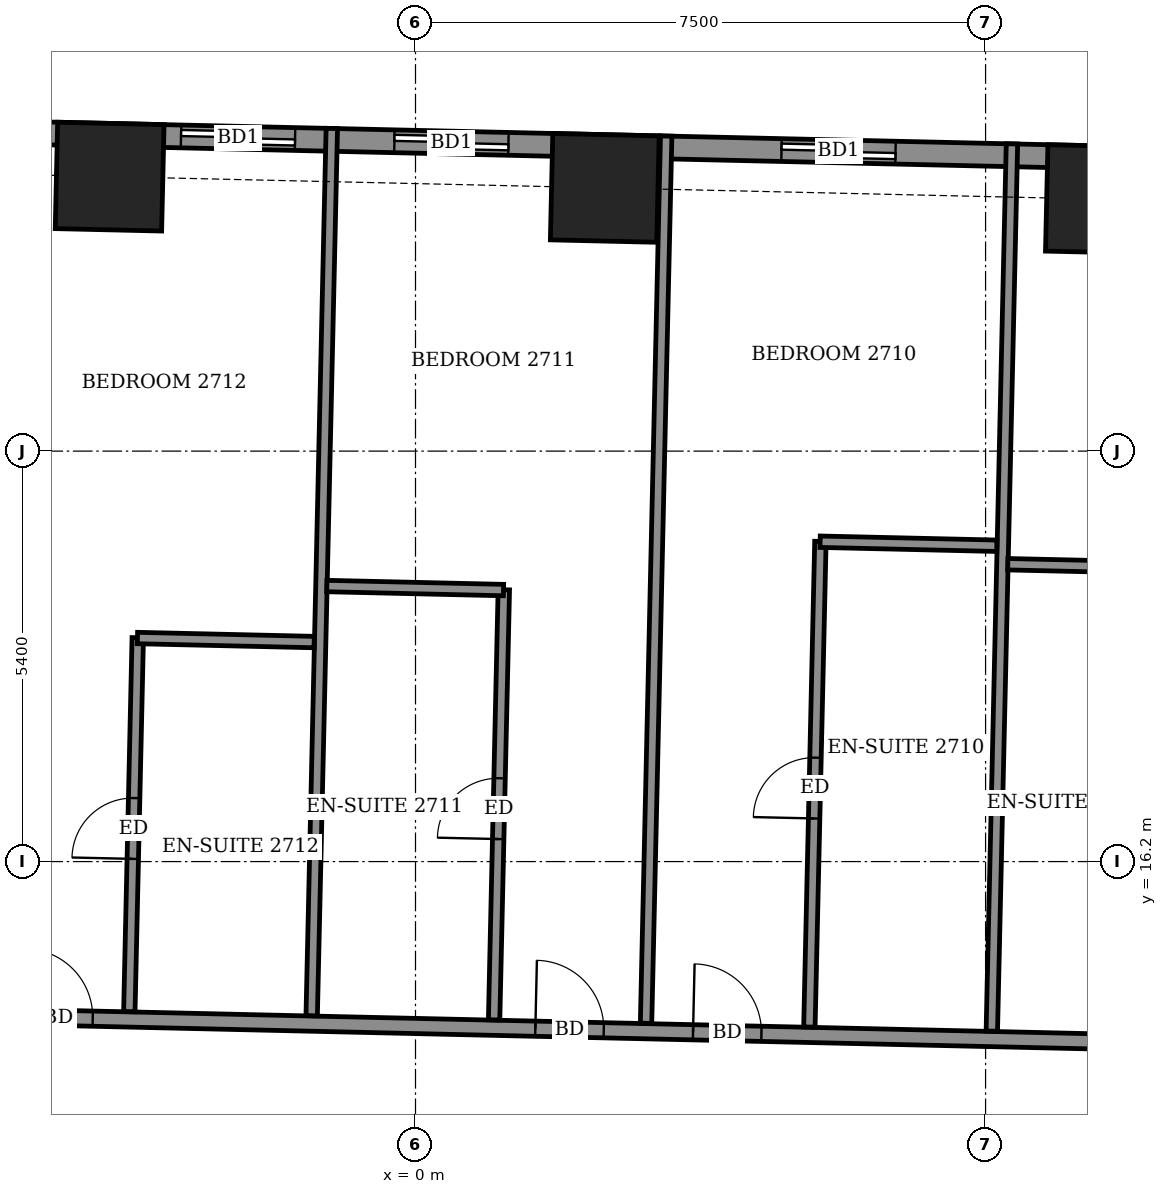
"""IFC4 building model, lengths in metres.
Left out: names, types, materials, properties, quantities, classifications, styles, units other than length and angle.
Written with IfcOpenShell. Run it as: python <this file> out.ifc"""

import sys

from ifc_helpers import new_model, si_unit, direction, frame, frame_2d, origin, origin_2d, place, context, subcontext, project, spatial, rectangle, extrude, element, fill, save


model = new_model("IFC4")
c1 = context("Model", 3, precision=1e-05, world=origin(), true_north=direction((0.0, 1.0)))
c2 = subcontext(c1, "Body", "Model", "MODEL_VIEW")
j1 = project(units=[si_unit("LENGTHUNIT", "METRE"), si_unit("PLANEANGLEUNIT", "RADIAN")], contexts=[c1])
p1 = place(None, origin())
s1 = spatial("IfcSite", under=j1, at=p1, CompositionType="ELEMENT")
p2 = place(p1, origin())
s2 = spatial("IfcBuilding", under=s1, at=p2, CompositionType="ELEMENT")
p3 = place(p2, frame((0.0, 0.0, 109.1)))
s3 = spatial("IfcBuildingStorey", under=s2, at=p3, CompositionType="ELEMENT", Elevation=109.1)
for number, where, z_axis, x_axis in (
    (1, (9.004, 24.915, -0.55), (0.0, 0.0, 1.0), (-1.0, 0.023, 0.0)),
    (2, (2.49, 25.063, -0.55), (0.0, 0.0, 1.0), (-1.0, 0.023, 0.0)),
    (3, (-4.024, 25.211, -0.55), (0.0, 0.0, 1.0), (-1.0, 0.023, 0.0)),
):
    element("IfcColumn", number, at=place(p3, frame(where, z_axis=z_axis, x_axis=x_axis)), inside=s3, PredefinedType="COLUMN", context=c2, shape_type="SweptSolid", body=[
        extrude(rectangle(XDim=1.4, YDim=1.4, at=origin_2d()), origin(), (0.0, 0.0, 1.0), 3.6),
    ])
p4 = place(p3, frame((21.894, 25.173, 0.0), z_axis=(0.0, 0.0, 1.0), x_axis=(-0.999742661083, 0.022685052594, 0.0)))
e4 = element("IfcWall", 4, at=p4, inside=s3, PredefinedType="SOLIDWALL", context=c2, shape_type="SweptSolid", body=[
    extrude(rectangle(XDim=45.309, YDim=0.3, at=frame_2d((22.654, 0.0))), origin(), (0.0, 0.0, 1.0), 3.05),
])
p5 = place(p4, frame((2.319, 0.0, 0.0)))
e5 = element("IfcOpeningElement", 5, at=p5, cuts=e4, PredefinedType="OPENING", context=c2, shape_type="SweptSolid", body=[
    extrude(rectangle(XDim=1.5, YDim=2.4, at=frame_2d((0.75, 1.2))), frame((0.0, 0.16, 0.0), z_axis=(0.0, -1.0, 0.0), x_axis=(1.0, 0.0, 0.0)), (0.0, 0.0, 1.0), 0.32),
])
p6 = place(p4, frame((7.437, 0.0, 0.0)))
e6 = element("IfcOpeningElement", 6, at=p6, cuts=e4, PredefinedType="OPENING", context=c2, shape_type="SweptSolid", body=[
    extrude(rectangle(XDim=1.5, YDim=2.4, at=frame_2d((0.75, 1.2))), frame((0.0, 0.16, 0.0), z_axis=(0.0, -1.0, 0.0), x_axis=(1.0, 0.0, 0.0)), (0.0, 0.0, 1.0), 0.32),
])
p7 = place(p4, frame((10.244, 0.0, 0.0)))
e7 = element("IfcOpeningElement", 7, at=p7, cuts=e4, PredefinedType="OPENING", context=c2, shape_type="SweptSolid", body=[
    extrude(rectangle(XDim=1.5, YDim=2.4, at=frame_2d((0.75, 1.2))), frame((0.0, 0.16, 0.0), z_axis=(0.0, -1.0, 0.0), x_axis=(1.0, 0.0, 0.0)), (0.0, 0.0, 1.0), 0.32),
])
p8 = place(p4, frame((15.583, 0.0, 0.0)))
e8 = element("IfcOpeningElement", 8, at=p8, cuts=e4, PredefinedType="OPENING", context=c2, shape_type="SweptSolid", body=[
    extrude(rectangle(XDim=1.5, YDim=2.4, at=frame_2d((0.75, 1.2))), frame((0.0, 0.16, 0.0), z_axis=(0.0, -1.0, 0.0), x_axis=(1.0, 0.0, 0.0)), (0.0, 0.0, 1.0), 0.32),
])
p9 = place(p4, frame((20.677, 0.0, 0.0)))
e9 = element("IfcOpeningElement", 9, at=p9, cuts=e4, PredefinedType="OPENING", context=c2, shape_type="SweptSolid", body=[
    extrude(rectangle(XDim=1.5, YDim=2.4, at=frame_2d((0.75, 1.2))), frame((0.0, 0.16, 0.0), z_axis=(0.0, -1.0, 0.0), x_axis=(1.0, 0.0, 0.0)), (0.0, 0.0, 1.0), 0.32),
])
p10 = place(p4, frame((23.485, 0.0, 0.0)))
e10 = element("IfcOpeningElement", 10, at=p10, cuts=e4, PredefinedType="OPENING", context=c2, shape_type="SweptSolid", body=[
    extrude(rectangle(XDim=1.5, YDim=2.4, at=frame_2d((0.75, 1.2))), frame((0.0, 0.16, 0.0), z_axis=(0.0, -1.0, 0.0), x_axis=(1.0, 0.0, 0.0)), (0.0, 0.0, 1.0), 0.32),
])
p11 = place(p4, frame((28.708, 0.0, 0.0)))
e11 = element("IfcOpeningElement", 11, at=p11, cuts=e4, PredefinedType="OPENING", context=c2, shape_type="SweptSolid", body=[
    extrude(rectangle(XDim=1.5, YDim=2.4, at=frame_2d((0.75, 1.2))), frame((0.0, 0.16, 0.0), z_axis=(0.0, -1.0, 0.0), x_axis=(1.0, 0.0, 0.0)), (0.0, 0.0, 1.0), 0.32),
])
p12 = place(p4, frame((33.793, 0.0, 0.0)))
e12 = element("IfcOpeningElement", 12, at=p12, cuts=e4, PredefinedType="OPENING", context=c2, shape_type="SweptSolid", body=[
    extrude(rectangle(XDim=1.5, YDim=2.4, at=frame_2d((0.75, 1.2))), frame((0.0, 0.16, 0.0), z_axis=(0.0, -1.0, 0.0), x_axis=(1.0, 0.0, 0.0)), (0.0, 0.0, 1.0), 0.32),
])
p13 = place(p4, frame((36.6, 0.0, 0.0)))
e13 = element("IfcOpeningElement", 13, at=p13, cuts=e4, PredefinedType="OPENING", context=c2, shape_type="SweptSolid", body=[
    extrude(rectangle(XDim=1.5, YDim=2.4, at=frame_2d((0.75, 1.2))), frame((0.0, 0.16, 0.0), z_axis=(0.0, -1.0, 0.0), x_axis=(1.0, 0.0, 0.0)), (0.0, 0.0, 1.0), 0.32),
])
p14 = place(p4, frame((41.318, 0.0, 0.9)))
e14 = element("IfcOpeningElement", 14, at=p14, cuts=e4, PredefinedType="OPENING", context=c2, shape_type="SweptSolid", body=[
    extrude(rectangle(XDim=2.4, YDim=1.5, at=frame_2d((1.2, 0.75))), frame((0.0, 0.16, 0.0), z_axis=(0.0, -1.0, 0.0), x_axis=(1.0, 0.0, 0.0)), (0.0, 0.0, 1.0), 0.32),
])
p15 = place(p3, frame((-26.316, 14.634, 0.0), z_axis=(0.0, 0.0, 1.0), x_axis=(0.999742734556, -0.02268181435, 0.0)))
e15 = element("IfcWall", 15, at=p15, inside=s3, PredefinedType="PARTITIONING", context=c2, shape_type="SweptSolid", body=[
    extrude(rectangle(XDim=50.708, YDim=0.2, at=frame_2d((25.354, 0.0))), origin(), (0.0, 0.0, 1.0), 3.05),
])
p16 = place(p15, frame((48.229, 0.0, 0.0)))
e16 = element("IfcOpeningElement", 16, at=p16, cuts=e15, PredefinedType="OPENING", context=c2, shape_type="SweptSolid", body=[
    extrude(rectangle(XDim=1.0, YDim=2.1, at=frame_2d((0.5, 1.05))), frame((0.0, 0.11, 0.0), z_axis=(0.0, -1.0, 0.0), x_axis=(1.0, 0.0, 0.0)), (0.0, 0.0, 1.0), 0.22),
])
p17 = place(p15, frame((43.6, 0.0, 0.0)))
e17 = element("IfcOpeningElement", 17, at=p17, cuts=e15, PredefinedType="OPENING", context=c2, shape_type="SweptSolid", body=[
    extrude(rectangle(XDim=0.9, YDim=2.1, at=frame_2d((0.45, 1.05))), frame((0.0, 0.11, 0.0), z_axis=(0.0, -1.0, 0.0), x_axis=(1.0, 0.0, 0.0)), (0.0, 0.0, 1.0), 0.22),
])
p18 = place(p15, frame((38.925, 0.0, 0.0)))
e18 = element("IfcOpeningElement", 18, at=p18, cuts=e15, PredefinedType="OPENING", context=c2, shape_type="SweptSolid", body=[
    extrude(rectangle(XDim=0.9, YDim=2.1, at=frame_2d((0.45, 1.05))), frame((0.0, 0.11, 0.0), z_axis=(0.0, -1.0, 0.0), x_axis=(1.0, 0.0, 0.0)), (0.0, 0.0, 1.0), 0.22),
])
p19 = place(p15, frame((36.9, 0.0, 0.0)))
e19 = element("IfcOpeningElement", 19, at=p19, cuts=e15, PredefinedType="OPENING", context=c2, shape_type="SweptSolid", body=[
    extrude(rectangle(XDim=0.9, YDim=2.1, at=frame_2d((0.45, 1.05))), frame((0.0, 0.11, 0.0), z_axis=(0.0, -1.0, 0.0), x_axis=(1.0, 0.0, 0.0)), (0.0, 0.0, 1.0), 0.22),
])
p20 = place(p15, frame((29.975, 0.0, 0.0)))
e20 = element("IfcOpeningElement", 20, at=p20, cuts=e15, PredefinedType="OPENING", context=c2, shape_type="SweptSolid", body=[
    extrude(rectangle(XDim=0.9, YDim=2.1, at=frame_2d((0.45, 1.05))), frame((0.0, 0.11, 0.0), z_axis=(0.0, -1.0, 0.0), x_axis=(1.0, 0.0, 0.0)), (0.0, 0.0, 1.0), 0.22),
])
p21 = place(p15, frame((27.9, 0.0, 0.0)))
e21 = element("IfcOpeningElement", 21, at=p21, cuts=e15, PredefinedType="OPENING", context=c2, shape_type="SweptSolid", body=[
    extrude(rectangle(XDim=0.9, YDim=2.1, at=frame_2d((0.45, 1.05))), frame((0.0, 0.11, 0.0), z_axis=(0.0, -1.0, 0.0), x_axis=(1.0, 0.0, 0.0)), (0.0, 0.0, 1.0), 0.22),
])
p22 = place(p15, frame((21.175, 0.0, 0.0)))
e22 = element("IfcOpeningElement", 22, at=p22, cuts=e15, PredefinedType="OPENING", context=c2, shape_type="SweptSolid", body=[
    extrude(rectangle(XDim=0.9, YDim=2.1, at=frame_2d((0.45, 1.05))), frame((0.0, 0.11, 0.0), z_axis=(0.0, -1.0, 0.0), x_axis=(1.0, 0.0, 0.0)), (0.0, 0.0, 1.0), 0.22),
])
p23 = place(p15, frame((19.25, 0.0, 0.0)))
e23 = element("IfcOpeningElement", 23, at=p23, cuts=e15, PredefinedType="OPENING", context=c2, shape_type="SweptSolid", body=[
    extrude(rectangle(XDim=0.9, YDim=2.1, at=frame_2d((0.45, 1.05))), frame((0.0, 0.11, 0.0), z_axis=(0.0, -1.0, 0.0), x_axis=(1.0, 0.0, 0.0)), (0.0, 0.0, 1.0), 0.22),
])
p24 = place(p15, frame((12.375, 0.0, 0.0)))
e24 = element("IfcOpeningElement", 24, at=p24, cuts=e15, PredefinedType="OPENING", context=c2, shape_type="SweptSolid", body=[
    extrude(rectangle(XDim=0.9, YDim=2.1, at=frame_2d((0.45, 1.05))), frame((0.0, 0.11, 0.0), z_axis=(0.0, -1.0, 0.0), x_axis=(1.0, 0.0, 0.0)), (0.0, 0.0, 1.0), 0.22),
])
p25 = place(p15, frame((10.225, 0.0, 0.0)))
e25 = element("IfcOpeningElement", 25, at=p25, cuts=e15, PredefinedType="OPENING", context=c2, shape_type="SweptSolid", body=[
    extrude(rectangle(XDim=0.9, YDim=2.1, at=frame_2d((0.45, 1.05))), frame((0.0, 0.11, 0.0), z_axis=(0.0, -1.0, 0.0), x_axis=(1.0, 0.0, 0.0)), (0.0, 0.0, 1.0), 0.22),
])
p26 = place(p15, frame((0.85, 0.0, 0.0)))
e26 = element("IfcOpeningElement", 26, at=p26, cuts=e15, PredefinedType="OPENING", context=c2, shape_type="SweptSolid", body=[
    extrude(rectangle(XDim=1.0, YDim=2.1, at=frame_2d((0.5, 1.05))), frame((0.0, 0.11, 0.0), z_axis=(0.0, -1.0, 0.0), x_axis=(1.0, 0.0, 0.0)), (0.0, 0.0, 1.0), 0.22),
])
p27 = place(p15, frame((5.55, 0.0, 0.0)))
e27 = element("IfcOpeningElement", 27, at=p27, cuts=e15, PredefinedType="OPENING", context=c2, shape_type="SweptSolid", body=[
    extrude(rectangle(XDim=0.9, YDim=2.1, at=frame_2d((0.45, 1.05))), frame((0.0, 0.11, 0.0), z_axis=(0.0, -1.0, 0.0), x_axis=(1.0, 0.0, 0.0)), (0.0, 0.0, 1.0), 0.22),
])
p28 = place(p3, frame((-3.765, 14.226, 0.0), z_axis=(0.0, 0.0, 1.0), x_axis=(0.022527535496, 0.999746222871, 0.0)))
e28 = element("IfcWall", 28, at=p28, inside=s3, PredefinedType="PARTITIONING", context=c2, shape_type="SweptSolid", body=[
    extrude(rectangle(XDim=4.92, YDim=0.15, at=frame_2d((2.46, 0.0))), origin(), (0.0, 0.0, 1.0), 3.05),
])
p29 = place(p28, frame((2.01, 0.0, 0.0)))
e29 = element("IfcOpeningElement", 29, at=p29, cuts=e28, PredefinedType="OPENING", context=c2, shape_type="SweptSolid", body=[
    extrude(rectangle(XDim=0.8, YDim=2.1, at=frame_2d((0.4, 1.05))), frame((0.0, 0.085, 0.0), z_axis=(0.0, -1.0, 0.0), x_axis=(1.0, 0.0, 0.0)), (0.0, 0.0, 1.0), 0.17),
])
p30 = place(p3, frame((-1.366, 14.172, 0.0), z_axis=(0.0, 0.0, 1.0), x_axis=(0.022687206857, 0.999742612198, 0.0)))
e30 = element("IfcWall", 30, at=p30, inside=s3, PredefinedType="PARTITIONING", context=c2, shape_type="SweptSolid", body=[
    extrude(rectangle(XDim=11.676, YDim=0.15, at=frame_2d((5.838, 0.0))), origin(), (0.0, 0.0, 1.0), 2.55),
])
p31 = place(p3, frame((1.034, 14.117, 0.0), z_axis=(0.0, 0.0, 1.0), x_axis=(0.022644004729, 0.999743591652, 0.0)))
e31 = element("IfcWall", 31, at=p31, inside=s3, PredefinedType="PARTITIONING", context=c2, shape_type="SweptSolid", body=[
    extrude(rectangle(XDim=5.66, YDim=0.15, at=frame_2d((2.83, 0.0))), origin(), (0.0, 0.0, 1.0), 3.05),
])
p32 = place(p31, frame((2.38, 0.0, 0.0)))
e32 = element("IfcOpeningElement", 32, at=p32, cuts=e31, PredefinedType="OPENING", context=c2, shape_type="SweptSolid", body=[
    extrude(rectangle(XDim=0.8, YDim=2.1, at=frame_2d((0.4, 1.05))), frame((0.0, 0.085, 0.0), z_axis=(0.0, -1.0, 0.0), x_axis=(1.0, 0.0, 0.0)), (0.0, 0.0, 1.0), 0.17),
])
p33 = place(p3, frame((3.033, 14.072, 0.0), z_axis=(0.0, 0.0, 1.0), x_axis=(0.022707631257, 0.999742148498, 0.0)))
e33 = element("IfcWall", 33, at=p33, inside=s3, PredefinedType="PARTITIONING", context=c2, shape_type="SweptSolid", body=[
    extrude(rectangle(XDim=11.676, YDim=0.15, at=frame_2d((5.838, 0.0))), origin(), (0.0, 0.0, 1.0), 2.55),
])
p34 = place(p3, frame((5.182, 14.023, 0.0), z_axis=(0.0, 0.0, 1.0), x_axis=(0.022691900969, 0.999742505664, 0.0)))
e34 = element("IfcWall", 34, at=p34, inside=s3, PredefinedType="PARTITIONING", context=c2, shape_type="SweptSolid", body=[
    extrude(rectangle(XDim=6.391, YDim=0.15, at=frame_2d((3.195, 0.0))), origin(), (0.0, 0.0, 1.0), 3.05),
])
p35 = place(p34, frame((2.745, 0.0, 0.0)))
e35 = element("IfcOpeningElement", 35, at=p35, cuts=e34, PredefinedType="OPENING", context=c2, shape_type="SweptSolid", body=[
    extrude(rectangle(XDim=0.8, YDim=2.1, at=frame_2d((0.4, 1.05))), frame((0.0, 0.085, 0.0), z_axis=(0.0, -1.0, 0.0), x_axis=(1.0, 0.0, 0.0)), (0.0, 0.0, 1.0), 0.17),
])
p36 = place(p3, frame((7.582, 13.969, 0.0), z_axis=(0.0, 0.0, 1.0), x_axis=(0.022686732602, 0.99974262296, 0.0)))
e36 = element("IfcWall", 36, at=p36, inside=s3, PredefinedType="PARTITIONING", context=c2, shape_type="SweptSolid", body=[
    extrude(rectangle(XDim=11.676, YDim=0.15, at=frame_2d((5.838, 0.0))), origin(), (0.0, 0.0, 1.0), 2.55),
])
for number, where, z_axis, x_axis in (
    (37, (-3.658, 19.141, 0.0), (0.0, 0.0, 1.0), (1.0, -0.023, 0.0)),
    (38, (-1.167, 19.825, 0.0), (0.0, 0.0, 1.0), (1.0, -0.023, 0.0)),
    (39, (7.792, 20.112, 0.0), (0.0, 0.0, 1.0), (1.0, -0.023, 0.0)),
    (40, (5.323, 20.408, 0.0), (0.0, 0.0, 1.0), (1.0, -0.023, 0.0)),
):
    element("IfcWall", number, at=place(p3, frame(where, z_axis=z_axis, x_axis=x_axis)), inside=s3, PredefinedType="PARTITIONING", context=c2, shape_type="SweptSolid", body=[
        extrude(rectangle(XDim=2.325, YDim=0.15, at=frame_2d((1.163, 0.0))), origin(), (0.0, 0.0, 1.0), 3.05),
    ])
p37 = place(p8, origin())
e41 = element("IfcDoor", 41, at=p37, inside=s3, OperationType="SLIDING_TO_LEFT", PredefinedType="DOOR", context=c2, shape_type="SweptSolid", body=[
    extrude(rectangle(XDim=1.5, YDim=2.4, at=frame_2d((0.75, 1.2))), frame((0.0, 0.025, 0.0), z_axis=(0.0, -1.0, 0.0), x_axis=(1.0, 0.0, 0.0)), (0.0, 0.0, 1.0), 0.05),
])
fill(e8, e41)
p38 = place(p9, origin())
e42 = element("IfcDoor", 42, at=p38, inside=s3, OperationType="SLIDING_TO_LEFT", PredefinedType="DOOR", context=c2, shape_type="SweptSolid", body=[
    extrude(rectangle(XDim=1.5, YDim=2.4, at=frame_2d((0.75, 1.2))), frame((0.0, 0.025, 0.0), z_axis=(0.0, -1.0, 0.0), x_axis=(1.0, 0.0, 0.0)), (0.0, 0.0, 1.0), 0.05),
])
fill(e9, e42)
p39 = place(p10, origin())
e43 = element("IfcDoor", 43, at=p39, inside=s3, OperationType="SLIDING_TO_LEFT", PredefinedType="DOOR", context=c2, shape_type="SweptSolid", body=[
    extrude(rectangle(XDim=1.5, YDim=2.4, at=frame_2d((0.75, 1.2))), frame((0.0, 0.025, 0.0), z_axis=(0.0, -1.0, 0.0), x_axis=(1.0, 0.0, 0.0)), (0.0, 0.0, 1.0), 0.05),
])
fill(e10, e43)
p40 = place(p20, origin())
e44 = element("IfcDoor", 44, at=p40, inside=s3, OperationType="SINGLE_SWING_RIGHT", PredefinedType="DOOR", context=c2, shape_type="SweptSolid", body=[
    extrude(rectangle(XDim=0.9, YDim=2.1, at=frame_2d((0.45, 1.05))), frame((0.0, 0.025, 0.0), z_axis=(0.0, -1.0, 0.0), x_axis=(1.0, 0.0, 0.0)), (0.0, 0.0, 1.0), 0.05),
])
fill(e20, e44)
p41 = place(p35, origin())
e45 = element("IfcDoor", 45, at=p41, inside=s3, OperationType="SINGLE_SWING_RIGHT", PredefinedType="DOOR", context=c2, shape_type="SweptSolid", body=[
    extrude(rectangle(XDim=0.8, YDim=2.1, at=frame_2d((0.4, 1.05))), frame((0.0, 0.025, 0.0), z_axis=(0.0, -1.0, 0.0), x_axis=(1.0, 0.0, 0.0)), (0.0, 0.0, 1.0), 0.05),
])
fill(e35, e45)
p42 = place(p21, origin())
e46 = element("IfcDoor", 46, at=p42, inside=s3, OperationType="SINGLE_SWING_LEFT", PredefinedType="DOOR", context=c2, shape_type="SweptSolid", body=[
    extrude(rectangle(XDim=0.9, YDim=2.1, at=frame_2d((0.45, 1.05))), frame((0.0, 0.025, 0.0), z_axis=(0.0, -1.0, 0.0), x_axis=(1.0, 0.0, 0.0)), (0.0, 0.0, 1.0), 0.05),
])
fill(e21, e46)
p43 = place(p32, origin())
e47 = element("IfcDoor", 47, at=p43, inside=s3, OperationType="SINGLE_SWING_LEFT", PredefinedType="DOOR", context=c2, shape_type="SweptSolid", body=[
    extrude(rectangle(XDim=0.8, YDim=2.1, at=frame_2d((0.4, 1.05))), frame((0.0, 0.025, 0.0), z_axis=(0.0, -1.0, 0.0), x_axis=(1.0, 0.0, 0.0)), (0.0, 0.0, 1.0), 0.05),
])
fill(e32, e47)
p44 = place(p22, origin())
e48 = element("IfcDoor", 48, at=p44, inside=s3, OperationType="SINGLE_SWING_RIGHT", PredefinedType="DOOR", context=c2, shape_type="SweptSolid", body=[
    extrude(rectangle(XDim=0.9, YDim=2.1, at=frame_2d((0.45, 1.05))), frame((0.0, 0.025, 0.0), z_axis=(0.0, -1.0, 0.0), x_axis=(1.0, 0.0, 0.0)), (0.0, 0.0, 1.0), 0.05),
])
fill(e22, e48)
p45 = place(p29, origin())
e49 = element("IfcDoor", 49, at=p45, inside=s3, OperationType="SINGLE_SWING_RIGHT", PredefinedType="DOOR", context=c2, shape_type="SweptSolid", body=[
    extrude(rectangle(XDim=0.8, YDim=2.1, at=frame_2d((0.4, 1.05))), frame((0.0, 0.025, 0.0), z_axis=(0.0, -1.0, 0.0), x_axis=(1.0, 0.0, 0.0)), (0.0, 0.0, 1.0), 0.05),
])
fill(e29, e49)
save(model, sys.argv[1])
